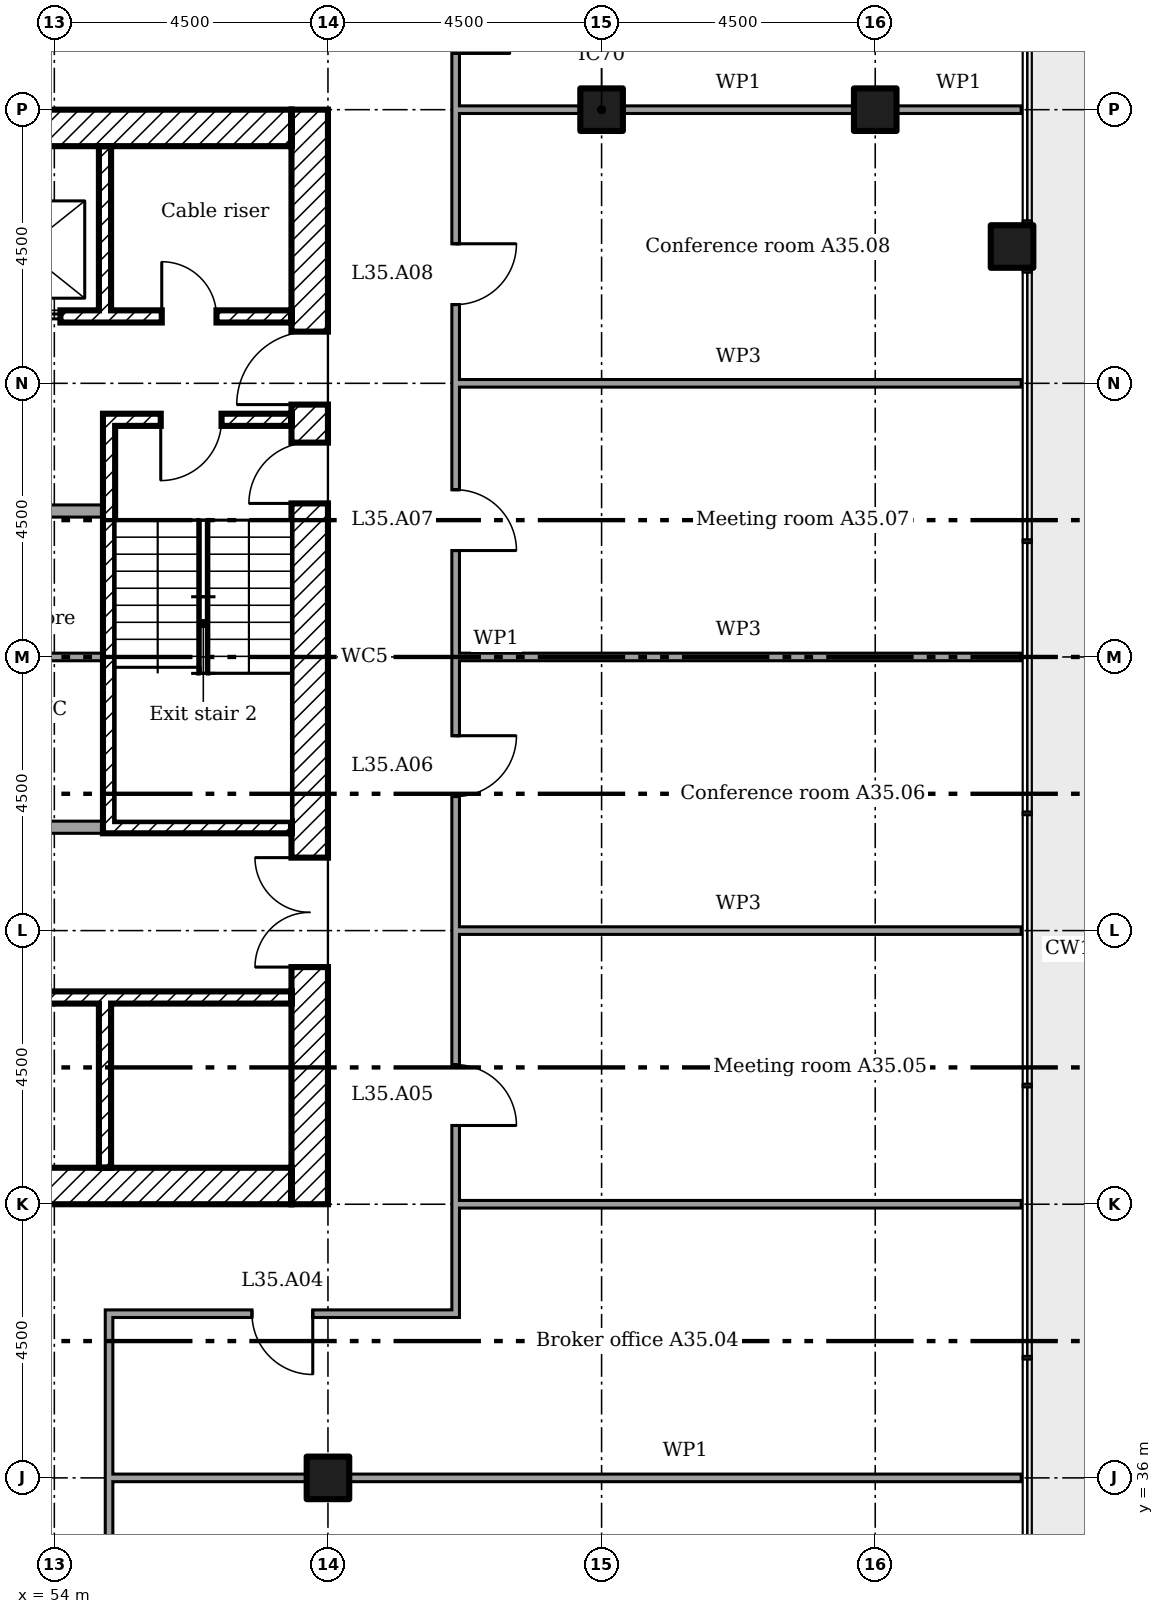
"""IFC4 building model, lengths in metres.
Left out: names, types, materials, properties, quantities, classifications, styles, units other than length and angle.
Written with IfcOpenShell. Run it as: python <this file> out.ifc"""

import sys

from ifc_helpers import new_model, si_unit, direction, frame, frame_2d, origin, origin_2d, place, context, subcontext, project, spatial, rectangle, extrude, element, fill, save


model = new_model("IFC4")
c1 = context("Model", 3, precision=1e-05, world=origin(), true_north=direction((0.0, 1.0)))
c2 = subcontext(c1, "Body", "Model", "MODEL_VIEW")
j1 = project(units=[si_unit("LENGTHUNIT", "METRE"), si_unit("PLANEANGLEUNIT", "RADIAN")], contexts=[c1])
p1 = place(None, origin())
s1 = spatial("IfcSite", under=j1, at=p1, CompositionType="ELEMENT")
p2 = place(p1, origin())
s2 = spatial("IfcBuilding", under=s1, at=p2, CompositionType="ELEMENT")
p3 = place(p2, frame((0.0, 0.0, 143.8)))
s3 = spatial("IfcBuildingStorey", under=s2, at=p3, CompositionType="ELEMENT", Elevation=143.8)
for number, where in (
    (1, (58.5, 36.0, 0.0)),
    (2, (63.0, 58.5, 0.0)),
    (3, (67.5, 58.5, 0.0)),
    (4, (69.75, 56.25, 0.0)),
):
    element("IfcColumn", number, at=place(p3, frame(where)), inside=s3, PredefinedType="COLUMN", context=c2, shape_type="SweptSolid", body=[
        extrude(rectangle(XDim=0.7, YDim=0.7, at=origin_2d()), origin(), (0.0, 0.0, 1.0), 3.6),
    ])
p4 = place(p3, frame((58.2, 40.5, 0.0), z_axis=(0.0, 0.0, 1.0), x_axis=(0.0, 1.0, 0.0)))
e5 = element("IfcWall", 5, at=p4, inside=s3, PredefinedType="SHEAR", context=c2, shape_type="SweptSolid", body=[
    extrude(rectangle(XDim=18.0, YDim=0.6, at=frame_2d((9.0, 0.0))), origin(), (0.0, 0.0, 1.0), 3.35),
])
p5 = place(p4, frame((13.15, 0.0, 0.0)))
e6 = element("IfcOpeningElement", 6, at=p5, cuts=e5, PredefinedType="OPENING", context=c2, shape_type="SweptSolid", body=[
    extrude(rectangle(XDim=1.2, YDim=2.1, at=frame_2d((0.6, 1.05))), frame((0.0, 0.31, 0.0), z_axis=(0.0, -1.0, 0.0), x_axis=(1.0, 0.0, 0.0)), (0.0, 0.0, 1.0), 0.62),
])
p6 = place(p4, frame((3.9, 0.0, 0.0)))
e7 = element("IfcOpeningElement", 7, at=p6, cuts=e5, PredefinedType="OPENING", context=c2, shape_type="SweptSolid", body=[
    extrude(rectangle(XDim=1.8, YDim=2.1, at=frame_2d((0.9, 1.05))), frame((0.0, 0.31, 0.0), z_axis=(0.0, -1.0, 0.0), x_axis=(1.0, 0.0, 0.0)), (0.0, 0.0, 1.0), 0.62),
])
p7 = place(p4, frame((11.525, 0.0, 0.0)))
e8 = element("IfcOpeningElement", 8, at=p7, cuts=e5, PredefinedType="OPENING", context=c2, shape_type="SweptSolid", body=[
    extrude(rectangle(XDim=1.0, YDim=2.1, at=frame_2d((0.5, 1.05))), frame((0.0, 0.31, 0.0), z_axis=(0.0, -1.0, 0.0), x_axis=(1.0, 0.0, 0.0)), (0.0, 0.0, 1.0), 0.62),
])
for number, where in (
    (9, (40.5, 58.2, 0.0)),
    (10, (40.5, 40.8, 0.0)),
):
    element("IfcWall", number, at=place(p3, frame(where)), inside=s3, PredefinedType="SHEAR", context=c2, shape_type="SweptSolid", body=[
        extrude(rectangle(XDim=17.4, YDim=0.6, at=frame_2d((8.7, 0.0))), origin(), (0.0, 0.0, 1.0), 3.35),
    ])
for number, where, z_axis, x_axis in (
    (11, (54.833, 57.9, 0.0), (0.0, 0.0, 1.0), (0.0, -1.0, 0.0)),
    (12, (54.833, 41.1, 0.0), (0.0, 0.0, 1.0), (0.0, 1.0, 0.0)),
):
    element("IfcWall", number, at=place(p3, frame(where, z_axis=z_axis, x_axis=x_axis)), inside=s3, PredefinedType="SHEAR", context=c2, shape_type="SweptSolid", body=[
        extrude(rectangle(XDim=2.7, YDim=0.2, at=frame_2d((1.35, 0.0))), origin(), (0.0, 0.0, 1.0), 3.35),
    ])
p8 = place(p3, frame((46.933, 55.1, 0.0)))
e13 = element("IfcWall", 13, at=p8, inside=s3, PredefinedType="SHEAR", context=c2, shape_type="SweptSolid", body=[
    extrude(rectangle(XDim=10.967, YDim=0.2, at=frame_2d((5.483, 0.0))), origin(), (0.0, 0.0, 1.0), 3.35),
])
p9 = place(p8, frame((8.833, 0.0, 0.0)))
e14 = element("IfcOpeningElement", 14, at=p9, cuts=e13, PredefinedType="OPENING", context=c2, shape_type="SweptSolid", body=[
    extrude(rectangle(XDim=0.9, YDim=2.1, at=frame_2d((0.45, 1.05))), frame((0.0, 0.11, 0.0), z_axis=(0.0, -1.0, 0.0), x_axis=(1.0, 0.0, 0.0)), (0.0, 0.0, 1.0), 0.22),
])
p10 = place(p8, frame((0.633, 0.0, 0.0)))
e15 = element("IfcOpeningElement", 15, at=p10, cuts=e13, PredefinedType="OPENING", context=c2, shape_type="SweptSolid", body=[
    extrude(rectangle(XDim=1.2, YDim=2.1, at=frame_2d((0.6, 1.05))), frame((0.0, 0.11, 0.0), z_axis=(0.0, -1.0, 0.0), x_axis=(1.0, 0.0, 0.0)), (0.0, 0.0, 1.0), 0.22),
])
p11 = place(p8, frame((3.3, 0.0, 0.0)))
e16 = element("IfcOpeningElement", 16, at=p11, cuts=e13, PredefinedType="OPENING", context=c2, shape_type="SweptSolid", body=[
    extrude(rectangle(XDim=1.2, YDim=2.1, at=frame_2d((0.6, 1.05))), frame((0.0, 0.11, 0.0), z_axis=(0.0, -1.0, 0.0), x_axis=(1.0, 0.0, 0.0)), (0.0, 0.0, 1.0), 0.22),
])
p12 = place(p8, frame((5.967, 0.0, 0.0)))
e17 = element("IfcOpeningElement", 17, at=p12, cuts=e13, PredefinedType="OPENING", context=c2, shape_type="SweptSolid", body=[
    extrude(rectangle(XDim=1.2, YDim=2.1, at=frame_2d((0.6, 1.05))), frame((0.0, 0.11, 0.0), z_axis=(0.0, -1.0, 0.0), x_axis=(1.0, 0.0, 0.0)), (0.0, 0.0, 1.0), 0.22),
])
p13 = place(p3, frame((41.1, 43.9, 0.0)))
e18 = element("IfcWall", 18, at=p13, inside=s3, PredefinedType="SHEAR", context=c2, shape_type="SweptSolid", body=[
    extrude(rectangle(XDim=16.8, YDim=0.2, at=frame_2d((8.4, 0.0))), origin(), (0.0, 0.0, 1.0), 3.35),
])
p14 = place(p13, frame((6.617, 0.0, 0.0)))
e19 = element("IfcOpeningElement", 19, at=p14, cuts=e18, PredefinedType="OPENING", context=c2, shape_type="SweptSolid", body=[
    extrude(rectangle(XDim=0.9, YDim=2.1, at=frame_2d((0.45, 1.05))), frame((0.0, 0.11, 0.0), z_axis=(0.0, -1.0, 0.0), x_axis=(1.0, 0.0, 0.0)), (0.0, 0.0, 1.0), 0.22),
])
p15 = place(p3, frame((54.8, 53.4, 0.0)))
e20 = element("IfcWall", 20, at=p15, inside=s3, PredefinedType="SHEAR", context=c2, shape_type="SweptSolid", body=[
    extrude(rectangle(XDim=3.1, YDim=0.2, at=frame_2d((1.55, 0.0))), origin(), (0.0, 0.0, 1.0), 3.35),
])
p16 = place(p15, frame((0.95, 0.0, 0.0)))
e21 = element("IfcOpeningElement", 21, at=p16, cuts=e20, PredefinedType="OPENING", context=c2, shape_type="SweptSolid", body=[
    extrude(rectangle(XDim=1.0, YDim=2.1, at=frame_2d((0.5, 1.05))), frame((0.0, 0.11, 0.0), z_axis=(0.0, -1.0, 0.0), x_axis=(1.0, 0.0, 0.0)), (0.0, 0.0, 1.0), 0.22),
])
p17 = place(p3, frame((54.8, 46.7, 0.0)))
e22 = element("IfcWall", 22, at=p17, inside=s3, PredefinedType="SHEAR", context=c2, shape_type="SweptSolid", body=[
    extrude(rectangle(XDim=3.1, YDim=0.2, at=frame_2d((1.55, 0.0))), origin(), (0.0, 0.0, 1.0), 3.35),
])
p18 = place(p3, frame((54.9, 46.8, 0.0), z_axis=(0.0, 0.0, 1.0), x_axis=(0.0, 1.0, 0.0)))
e23 = element("IfcWall", 23, at=p18, inside=s3, PredefinedType="SHEAR", context=c2, shape_type="SweptSolid", body=[
    extrude(rectangle(XDim=6.5, YDim=0.2, at=frame_2d((3.25, 0.0))), origin(), (0.0, 0.0, 1.0), 3.35),
])
p19 = place(p3, frame((44.2, 51.9, 0.0)))
e24 = element("IfcWall", 24, at=p19, inside=s3, PredefinedType="PARTITIONING", context=c2, shape_type="SweptSolid", body=[
    extrude(rectangle(XDim=10.6, YDim=0.2, at=frame_2d((5.3, 0.0))), origin(), (0.0, 0.0, 1.0), 3.35),
])
p20 = place(p19, frame((8.45, 0.0, 0.0)))
e25 = element("IfcOpeningElement", 25, at=p20, cuts=e24, PredefinedType="OPENING", context=c2, shape_type="SweptSolid", body=[
    extrude(rectangle(XDim=0.9, YDim=2.1, at=frame_2d((0.45, 1.05))), frame((0.0, 0.11, 0.0), z_axis=(0.0, -1.0, 0.0), x_axis=(1.0, 0.0, 0.0)), (0.0, 0.0, 1.0), 0.22),
])
p21 = place(p3, frame((44.2, 46.7, 0.0)))
e26 = element("IfcWall", 26, at=p21, inside=s3, PredefinedType="PARTITIONING", context=c2, shape_type="SweptSolid", body=[
    extrude(rectangle(XDim=10.6, YDim=0.2, at=frame_2d((5.3, 0.0))), origin(), (0.0, 0.0, 1.0), 3.35),
])
p22 = place(p21, frame((1.4, 0.0, 0.0)))
e27 = element("IfcOpeningElement", 27, at=p22, cuts=e26, PredefinedType="OPENING", context=c2, shape_type="SweptSolid", body=[
    extrude(rectangle(XDim=0.9, YDim=2.1, at=frame_2d((0.45, 1.05))), frame((0.0, 0.11, 0.0), z_axis=(0.0, -1.0, 0.0), x_axis=(1.0, 0.0, 0.0)), (0.0, 0.0, 1.0), 0.22),
])
p23 = place(p21, frame((5.0, 0.0, 0.0)))
e28 = element("IfcOpeningElement", 28, at=p23, cuts=e26, PredefinedType="OPENING", context=c2, shape_type="SweptSolid", body=[
    extrude(rectangle(XDim=0.9, YDim=2.1, at=frame_2d((0.45, 1.05))), frame((0.0, 0.11, 0.0), z_axis=(0.0, -1.0, 0.0), x_axis=(1.0, 0.0, 0.0)), (0.0, 0.0, 1.0), 0.22),
])
p24 = place(p21, frame((8.45, 0.0, 0.0)))
e29 = element("IfcOpeningElement", 29, at=p24, cuts=e26, PredefinedType="OPENING", context=c2, shape_type="SweptSolid", body=[
    extrude(rectangle(XDim=0.9, YDim=2.1, at=frame_2d((0.45, 1.05))), frame((0.0, 0.11, 0.0), z_axis=(0.0, -1.0, 0.0), x_axis=(1.0, 0.0, 0.0)), (0.0, 0.0, 1.0), 0.22),
])
p25 = place(p3, frame((54.8, 49.5, 0.0), z_axis=(0.0, 0.0, 1.0), x_axis=(-1.0, 0.0, 0.0)))
e30 = element("IfcWall", 30, at=p25, inside=s3, PredefinedType="PARTITIONING", context=c2, shape_type="SweptSolid", body=[
    extrude(rectangle(XDim=3.338, YDim=0.125, at=frame_2d((1.669, 0.0))), origin(), (0.0, 0.0, 1.0), 3.35),
])
p26 = place(p3, frame((54.9, 36.0, 0.0)))
e31 = element("IfcWall", 31, at=p26, inside=s3, PredefinedType="PARTITIONING", context=c2, shape_type="SweptSolid", body=[
    extrude(rectangle(XDim=3.25, YDim=0.125, at=frame_2d((1.625, 0.0))), origin(), (0.0, 0.0, 1.0), 3.45),
])
p27 = place(p3, frame((58.85, 36.0, 0.0)))
e32 = element("IfcWall", 32, at=p27, inside=s3, PredefinedType="PARTITIONING", context=c2, shape_type="SweptSolid", body=[
    extrude(rectangle(XDim=11.05, YDim=0.125, at=frame_2d((5.525, 0.0))), origin(), (0.0, 0.0, 1.0), 2.766),
])
p28 = place(p3, frame((54.837, 38.7, 0.0)))
e33 = element("IfcWall", 33, at=p28, inside=s3, PredefinedType="PARTITIONING", context=c2, shape_type="SweptSolid", body=[
    extrude(rectangle(XDim=5.825, YDim=0.125, at=frame_2d((2.913, 0.0))), origin(), (0.0, 0.0, 1.0), 3.45),
])
p29 = place(p28, frame((2.413, 0.0, 0.0)))
e34 = element("IfcOpeningElement", 34, at=p29, cuts=e33, PredefinedType="OPENING", context=c2, shape_type="SweptSolid", body=[
    extrude(rectangle(XDim=1.0, YDim=2.1, at=frame_2d((0.5, 1.05))), frame((0.0, 0.073, 0.0), z_axis=(0.0, -1.0, 0.0), x_axis=(1.0, 0.0, 0.0)), (0.0, 0.0, 1.0), 0.145),
])
p30 = place(p3, frame((60.6, 40.5, 0.0)))
e35 = element("IfcWall", 35, at=p30, inside=s3, PredefinedType="PARTITIONING", context=c2, shape_type="SweptSolid", body=[
    extrude(rectangle(XDim=9.3, YDim=0.125, at=frame_2d((4.65, 0.0))), origin(), (0.0, 0.0, 1.0), 2.766),
])
for number, where in (
    (36, (60.6, 45.0, 0.0)),
    (37, (60.6, 49.5, 0.0)),
    (38, (60.6, 54.0, 0.0)),
):
    element("IfcWall", number, at=place(p3, frame(where)), inside=s3, PredefinedType="MOVABLE", context=c2, shape_type="SweptSolid", body=[
        extrude(rectangle(XDim=9.3, YDim=0.125, at=frame_2d((4.65, 0.0))), origin(), (0.0, 0.0, 1.0), 2.766),
    ])
p31 = place(p3, frame((60.6, 58.5, 0.0)))
e39 = element("IfcWall", 39, at=p31, inside=s3, PredefinedType="PARTITIONING", context=c2, shape_type="SweptSolid", body=[
    extrude(rectangle(XDim=2.05, YDim=0.125, at=frame_2d((1.025, 0.0))), origin(), (0.0, 0.0, 1.0), 2.676),
])
p32 = place(p3, frame((63.35, 58.5, 0.0)))
e40 = element("IfcWall", 40, at=p32, inside=s3, PredefinedType="PARTITIONING", context=c2, shape_type="SweptSolid", body=[
    extrude(rectangle(XDim=3.8, YDim=0.125, at=frame_2d((1.9, 0.0))), origin(), (0.0, 0.0, 1.0), 2.676),
])
p33 = place(p3, frame((67.85, 58.5, 0.0)))
e41 = element("IfcWall", 41, at=p33, inside=s3, PredefinedType="PARTITIONING", context=c2, shape_type="SweptSolid", body=[
    extrude(rectangle(XDim=2.05, YDim=0.125, at=frame_2d((1.025, 0.0))), origin(), (0.0, 0.0, 1.0), 2.676),
])
p34 = place(p3, frame((54.9, 29.1, 0.0), z_axis=(0.0, 0.0, 1.0), x_axis=(0.0, 1.0, 0.0)))
e42 = element("IfcWall", 42, at=p34, inside=s3, PredefinedType="PARTITIONING", context=c2, shape_type="SweptSolid", body=[
    extrude(rectangle(XDim=9.537, YDim=0.125, at=frame_2d((4.769, 0.0))), origin(), (0.0, 0.0, 1.0), 3.45),
])
p35 = place(p34, frame((3.825, 0.0, 0.0)))
e43 = element("IfcOpeningElement", 43, at=p35, cuts=e42, PredefinedType="OPENING", context=c2, shape_type="SweptSolid", body=[
    extrude(rectangle(XDim=1.0, YDim=2.1, at=frame_2d((0.5, 1.05))), frame((0.0, 0.073, 0.0), z_axis=(0.0, -1.0, 0.0), x_axis=(1.0, 0.0, 0.0)), (0.0, 0.0, 1.0), 0.145),
])
p36 = place(p3, frame((60.6, 38.762, 0.0), z_axis=(0.0, 0.0, 1.0), x_axis=(0.0, 1.0, 0.0)))
e44 = element("IfcWall", 44, at=p36, inside=s3, PredefinedType="PARTITIONING", context=c2, shape_type="SweptSolid", body=[
    extrude(rectangle(XDim=22.075, YDim=0.125, at=frame_2d((11.038, 0.0))), origin(), (0.0, 0.0, 1.0), 3.45),
])
p37 = place(p36, frame((3.032, 0.0, 0.0)))
e45 = element("IfcOpeningElement", 45, at=p37, cuts=e44, PredefinedType="OPENING", context=c2, shape_type="SweptSolid", body=[
    extrude(rectangle(XDim=1.0, YDim=2.1, at=frame_2d((0.5, 1.05))), frame((0.0, 0.073, 0.0), z_axis=(0.0, -1.0, 0.0), x_axis=(1.0, 0.0, 0.0)), (0.0, 0.0, 1.0), 0.145),
])
p38 = place(p36, frame((8.442, 0.0, 0.0)))
e46 = element("IfcOpeningElement", 46, at=p38, cuts=e44, PredefinedType="OPENING", context=c2, shape_type="SweptSolid", body=[
    extrude(rectangle(XDim=1.0, YDim=2.1, at=frame_2d((0.5, 1.05))), frame((0.0, 0.073, 0.0), z_axis=(0.0, -1.0, 0.0), x_axis=(1.0, 0.0, 0.0)), (0.0, 0.0, 1.0), 0.145),
])
p39 = place(p36, frame((12.488, 0.0, 0.0)))
e47 = element("IfcOpeningElement", 47, at=p39, cuts=e44, PredefinedType="OPENING", context=c2, shape_type="SweptSolid", body=[
    extrude(rectangle(XDim=1.0, YDim=2.1, at=frame_2d((0.5, 1.05))), frame((0.0, 0.073, 0.0), z_axis=(0.0, -1.0, 0.0), x_axis=(1.0, 0.0, 0.0)), (0.0, 0.0, 1.0), 0.145),
])
p40 = place(p36, frame((16.532, 0.0, 0.0)))
e48 = element("IfcOpeningElement", 48, at=p40, cuts=e44, PredefinedType="OPENING", context=c2, shape_type="SweptSolid", body=[
    extrude(rectangle(XDim=1.0, YDim=2.1, at=frame_2d((0.5, 1.05))), frame((0.0, 0.073, 0.0), z_axis=(0.0, -1.0, 0.0), x_axis=(1.0, 0.0, 0.0)), (0.0, 0.0, 1.0), 0.145),
])
p41 = place(p36, frame((20.663, 0.0, 0.0)))
e49 = element("IfcOpeningElement", 49, at=p41, cuts=e44, PredefinedType="OPENING", context=c2, shape_type="SweptSolid", body=[
    extrude(rectangle(XDim=0.9, YDim=2.1, at=frame_2d((0.45, 1.05))), frame((0.0, 0.073, 0.0), z_axis=(0.0, -1.0, 0.0), x_axis=(1.0, 0.0, 0.0)), (0.0, 0.0, 1.0), 0.145),
])
p42 = place(p5, origin())
e50 = element("IfcDoor", 50, at=p42, inside=s3, OperationType="SINGLE_SWING_RIGHT", PredefinedType="DOOR", context=c2, shape_type="SweptSolid", body=[
    extrude(rectangle(XDim=1.2, YDim=2.1, at=frame_2d((0.6, 1.05))), frame((0.0, 0.025, 0.0), z_axis=(0.0, -1.0, 0.0), x_axis=(1.0, 0.0, 0.0)), (0.0, 0.0, 1.0), 0.05),
])
fill(e6, e50)
p43 = place(p6, origin())
e51 = element("IfcDoor", 51, at=p43, inside=s3, OperationType="DOUBLE_DOOR_SINGLE_SWING", PredefinedType="DOOR", context=c2, shape_type="SweptSolid", body=[
    extrude(rectangle(XDim=1.8, YDim=2.1, at=frame_2d((0.9, 1.05))), frame((0.0, 0.025, 0.0), z_axis=(0.0, -1.0, 0.0), x_axis=(1.0, 0.0, 0.0)), (0.0, 0.0, 1.0), 0.05),
])
fill(e7, e51)
p44 = place(p16, frame((1.0, 0.0, 0.0), x_axis=(-1.0, 0.0, 0.0)))
e52 = element("IfcDoor", 52, at=p44, inside=s3, OperationType="SINGLE_SWING_LEFT", PredefinedType="DOOR", context=c2, shape_type="SweptSolid", body=[
    extrude(rectangle(XDim=1.0, YDim=2.1, at=frame_2d((0.5, 1.05))), frame((0.0, 0.025, 0.0), z_axis=(0.0, -1.0, 0.0), x_axis=(1.0, 0.0, 0.0)), (0.0, 0.0, 1.0), 0.05),
])
fill(e21, e52)
p45 = place(p7, origin())
e53 = element("IfcDoor", 53, at=p45, inside=s3, OperationType="SINGLE_SWING_RIGHT", PredefinedType="DOOR", context=c2, shape_type="SweptSolid", body=[
    extrude(rectangle(XDim=1.0, YDim=2.1, at=frame_2d((0.5, 1.05))), frame((0.0, 0.025, 0.0), z_axis=(0.0, -1.0, 0.0), x_axis=(1.0, 0.0, 0.0)), (0.0, 0.0, 1.0), 0.05),
])
fill(e8, e53)
p46 = place(p9, origin())
e54 = element("IfcDoor", 54, at=p46, inside=s3, OperationType="SINGLE_SWING_RIGHT", PredefinedType="DOOR", context=c2, shape_type="SweptSolid", body=[
    extrude(rectangle(XDim=0.9, YDim=2.1, at=frame_2d((0.45, 1.05))), frame((0.0, 0.025, 0.0), z_axis=(0.0, -1.0, 0.0), x_axis=(1.0, 0.0, 0.0)), (0.0, 0.0, 1.0), 0.05),
])
fill(e14, e54)
p47 = place(p12, origin())
e55 = element("IfcDoor", 55, at=p47, inside=s3, OperationType="SLIDING_TO_LEFT", PredefinedType="DOOR", context=c2, shape_type="SweptSolid", body=[
    extrude(rectangle(XDim=1.2, YDim=2.1, at=frame_2d((0.6, 1.05))), frame((0.0, 0.025, 0.0), z_axis=(0.0, -1.0, 0.0), x_axis=(1.0, 0.0, 0.0)), (0.0, 0.0, 1.0), 0.05),
])
fill(e17, e55)
p48 = place(p29, frame((1.0, 0.0, 0.0), x_axis=(-1.0, 0.0, 0.0)))
e56 = element("IfcDoor", 56, at=p48, inside=s3, OperationType="SINGLE_SWING_RIGHT", PredefinedType="DOOR", context=c2, shape_type="SweptSolid", body=[
    extrude(rectangle(XDim=1.0, YDim=2.1, at=frame_2d((0.5, 1.05))), frame((0.0, 0.025, 0.0), z_axis=(0.0, -1.0, 0.0), x_axis=(1.0, 0.0, 0.0)), (0.0, 0.0, 1.0), 0.05),
])
fill(e34, e56)
p49 = place(p37, frame((1.0, 0.0, 0.0), x_axis=(-1.0, 0.0, 0.0)))
e57 = element("IfcDoor", 57, at=p49, inside=s3, OperationType="SINGLE_SWING_LEFT", PredefinedType="DOOR", context=c2, shape_type="SweptSolid", body=[
    extrude(rectangle(XDim=1.0, YDim=2.1, at=frame_2d((0.5, 1.05))), frame((0.0, 0.025, 0.0), z_axis=(0.0, -1.0, 0.0), x_axis=(1.0, 0.0, 0.0)), (0.0, 0.0, 1.0), 0.05),
])
fill(e45, e57)
p50 = place(p38, frame((1.0, 0.0, 0.0), x_axis=(-1.0, 0.0, 0.0)))
e58 = element("IfcDoor", 58, at=p50, inside=s3, OperationType="SINGLE_SWING_RIGHT", PredefinedType="DOOR", context=c2, shape_type="SweptSolid", body=[
    extrude(rectangle(XDim=1.0, YDim=2.1, at=frame_2d((0.5, 1.05))), frame((0.0, 0.025, 0.0), z_axis=(0.0, -1.0, 0.0), x_axis=(1.0, 0.0, 0.0)), (0.0, 0.0, 1.0), 0.05),
])
fill(e46, e58)
p51 = place(p39, frame((1.0, 0.0, 0.0), x_axis=(-1.0, 0.0, 0.0)))
e59 = element("IfcDoor", 59, at=p51, inside=s3, OperationType="SINGLE_SWING_LEFT", PredefinedType="DOOR", context=c2, shape_type="SweptSolid", body=[
    extrude(rectangle(XDim=1.0, YDim=2.1, at=frame_2d((0.5, 1.05))), frame((0.0, 0.025, 0.0), z_axis=(0.0, -1.0, 0.0), x_axis=(1.0, 0.0, 0.0)), (0.0, 0.0, 1.0), 0.05),
])
fill(e47, e59)
p52 = place(p40, frame((1.0, 0.0, 0.0), x_axis=(-1.0, 0.0, 0.0)))
e60 = element("IfcDoor", 60, at=p52, inside=s3, OperationType="SINGLE_SWING_RIGHT", PredefinedType="DOOR", context=c2, shape_type="SweptSolid", body=[
    extrude(rectangle(XDim=1.0, YDim=2.1, at=frame_2d((0.5, 1.05))), frame((0.0, 0.025, 0.0), z_axis=(0.0, -1.0, 0.0), x_axis=(1.0, 0.0, 0.0)), (0.0, 0.0, 1.0), 0.05),
])
fill(e48, e60)
p53 = place(p41, frame((0.9, 0.0, 0.0), x_axis=(-1.0, 0.0, 0.0)))
e61 = element("IfcDoor", 61, at=p53, inside=s3, OperationType="SINGLE_SWING_LEFT", PredefinedType="DOOR", context=c2, shape_type="SweptSolid", body=[
    extrude(rectangle(XDim=0.9, YDim=2.1, at=frame_2d((0.45, 1.05))), frame((0.0, 0.025, 0.0), z_axis=(0.0, -1.0, 0.0), x_axis=(1.0, 0.0, 0.0)), (0.0, 0.0, 1.0), 0.05),
])
fill(e49, e61)
save(model, sys.argv[1])
